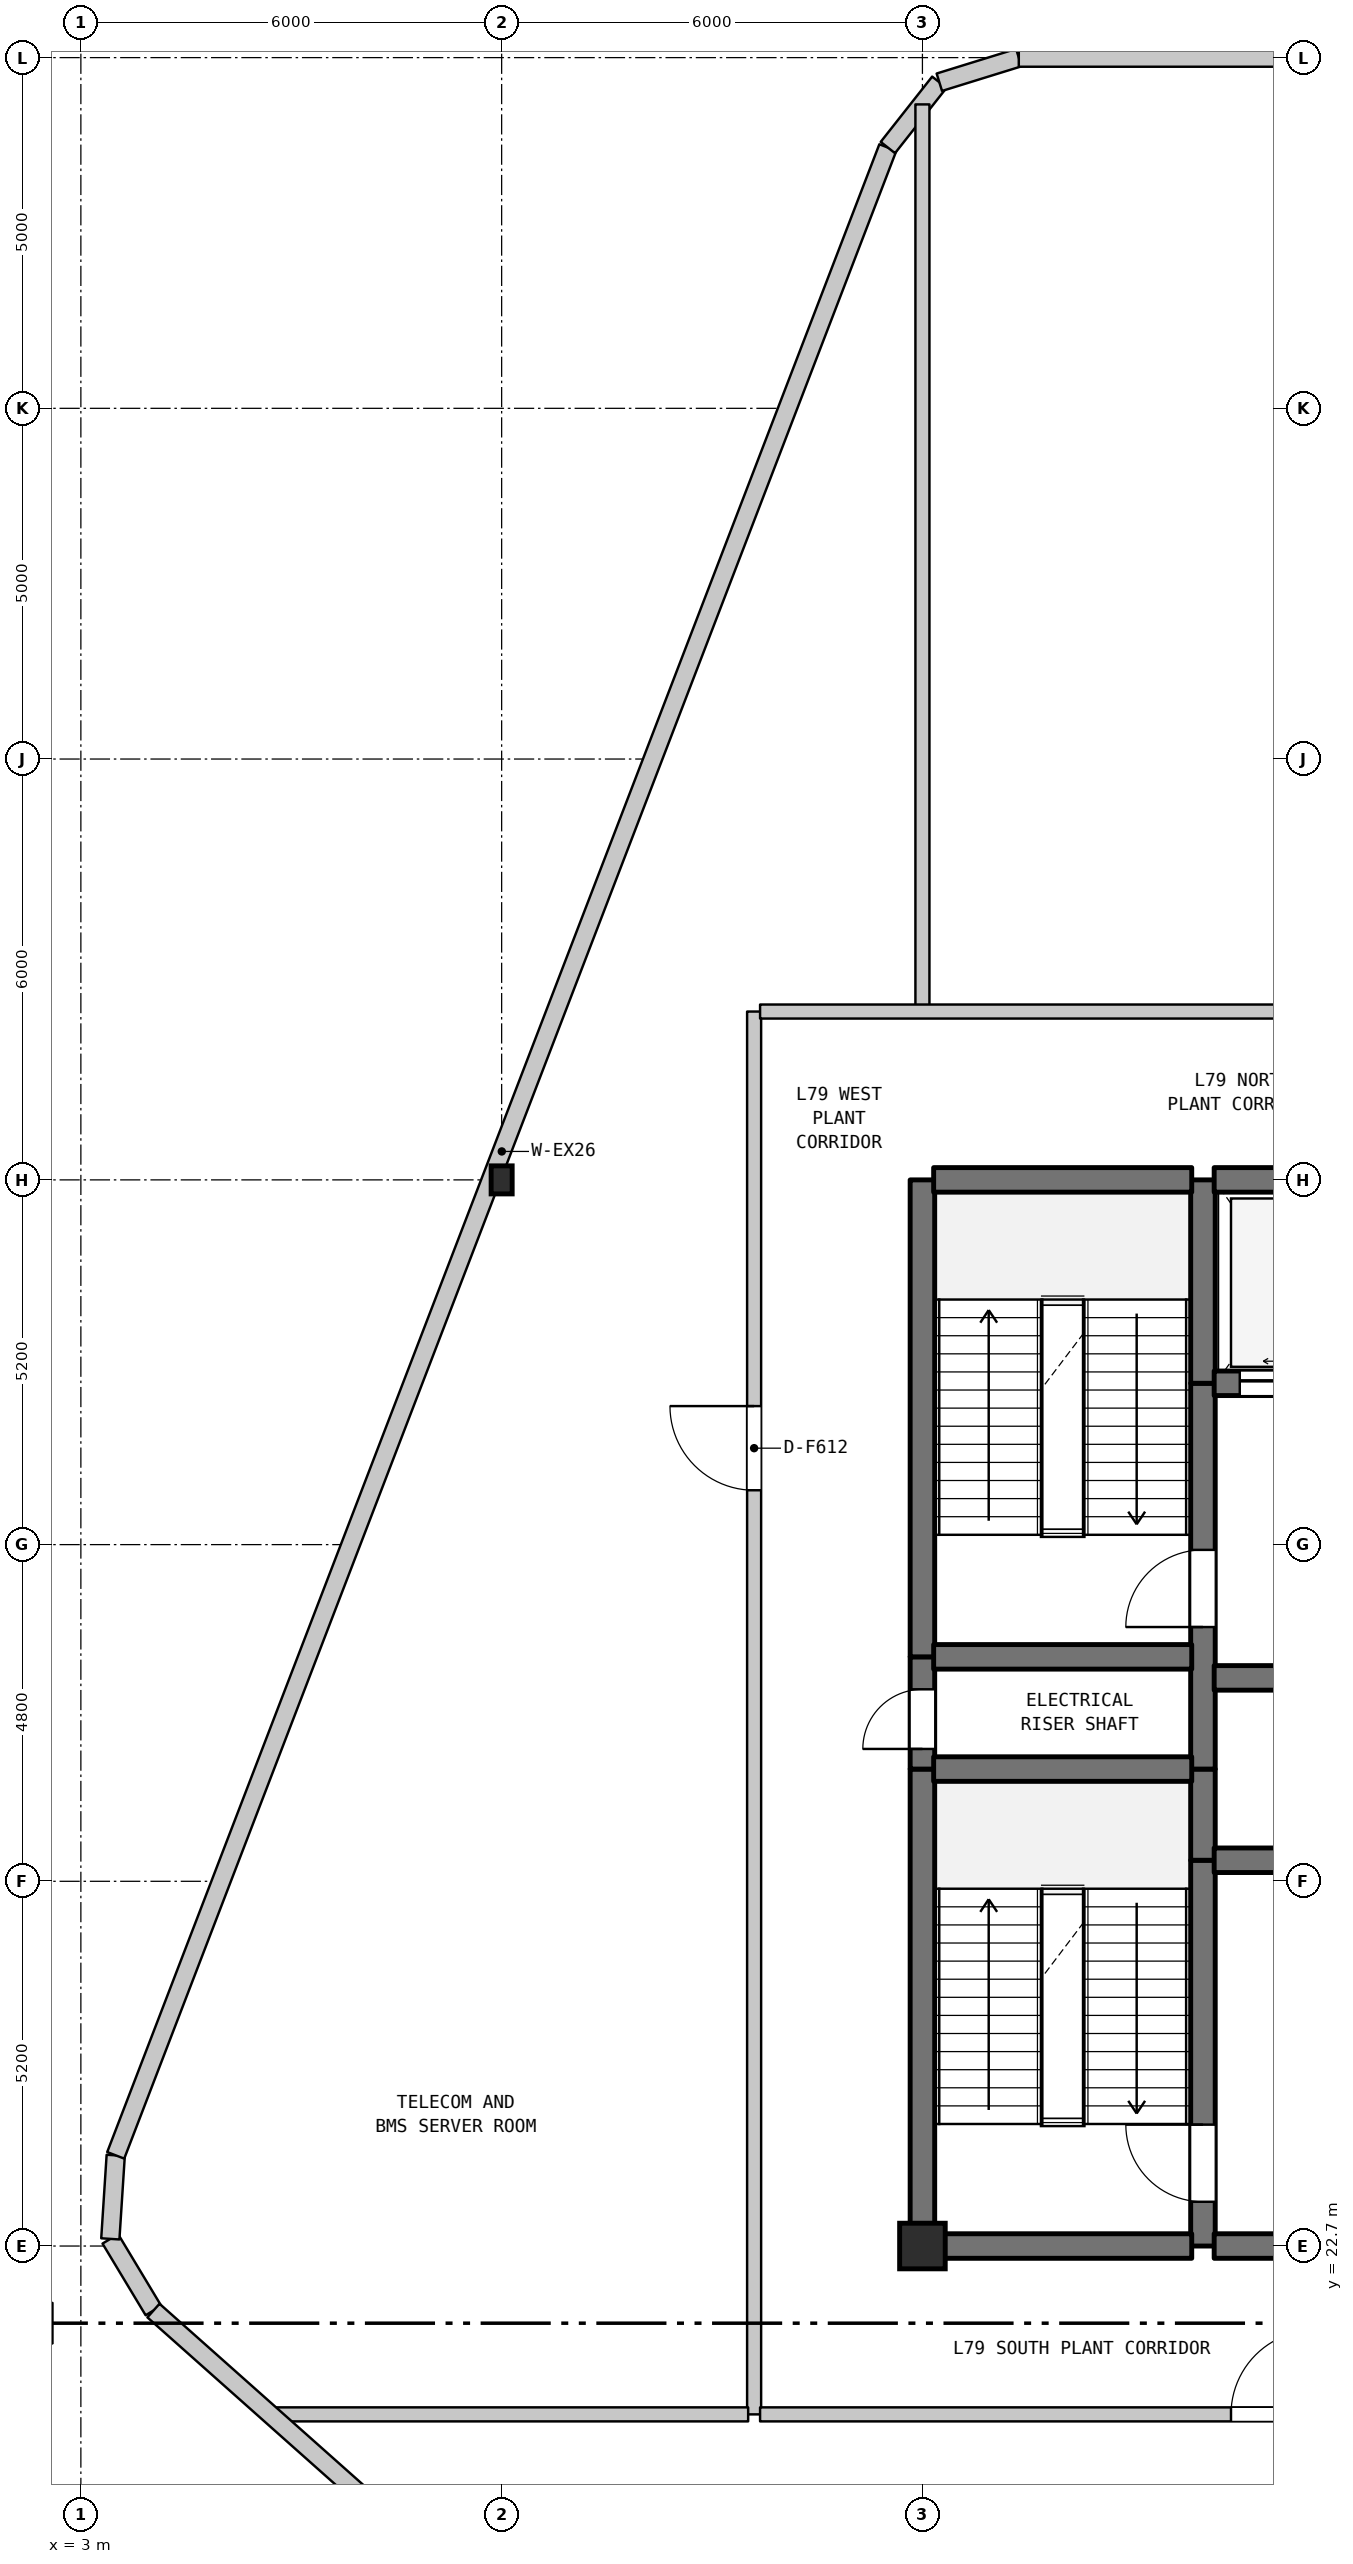
"""IFC4 building model, lengths in metres.
Left out: names, types, materials, properties, quantities, classifications, styles, units other than length and angle.
Written with IfcOpenShell. Run it as: python <this file> out.ifc"""

import sys

from ifc_helpers import new_model, si_unit, direction, frame, frame_2d, origin, origin_2d, place, context, subcontext, project, spatial, rectangle, i_section, extrude, element, fill, save


model = new_model("IFC4")
c1 = context("Model", 3, precision=1e-05, world=origin(), true_north=direction((0.0, 1.0)))
c2 = subcontext(c1, "Body", "Model", "MODEL_VIEW")
j1 = project(units=[si_unit("LENGTHUNIT", "METRE"), si_unit("PLANEANGLEUNIT", "RADIAN")], contexts=[c1])
p1 = place(None, origin())
s1 = spatial("IfcSite", under=j1, at=p1, CompositionType="ELEMENT")
p2 = place(p1, origin())
s2 = spatial("IfcBuilding", under=s1, at=p2, CompositionType="ELEMENT")
p3 = place(p2, frame((0.0, 0.0, 314.7)))
s3 = spatial("IfcBuildingStorey", under=s2, at=p3, CompositionType="ELEMENT", Elevation=314.7)
p4 = place(p3, frame((9.0, 37.9, 0.0), z_axis=(0.0, 0.0, 1.0), x_axis=(1.0, 0.0, 0.0)))
e1 = element("IfcColumn", 1, at=p4, inside=s3, PredefinedType="COLUMN", context=c2, shape_type="SweptSolid", body=[
    extrude(i_section(OverallWidth=0.3, OverallDepth=0.4, WebThickness=0.013, FlangeThickness=0.024, FilletRadius=0.027, at=origin_2d()), origin(), (0.0, 0.0, 1.0), 5.3),
])
p5 = place(p3, frame((15.0, 22.7, 0.0), z_axis=(0.0, 0.0, 1.0), x_axis=(1.0, 0.0, 0.0)))
e2 = element("IfcColumn", 2, at=p5, inside=s3, PredefinedType="COLUMN", context=c2, shape_type="SweptSolid", body=[
    extrude(rectangle(XDim=0.65, YDim=0.65, at=origin_2d()), origin(), (0.0, 0.0, 1.0), 5.3),
])
p6 = place(p3, frame((4.035, 21.78, 0.0), z_axis=(0.0, 0.0, 1.0), x_axis=(-0.51560906497, 0.856823956318, 0.0)))
e3 = element("IfcWall", 3, at=p6, inside=s3, PredefinedType="STANDARD", context=c2, shape_type="SweptSolid", body=[
    extrude(rectangle(XDim=1.193, YDim=0.26, at=frame_2d((0.596, 0.0))), origin(), (0.0, 0.0, 1.0), 4.99),
])
p7 = place(p3, frame((3.42, 22.802, 0.0), z_axis=(0.0, 0.0, 1.0), x_axis=(0.064645147091, 0.997908314906, 0.0)))
e4 = element("IfcWall", 4, at=p7, inside=s3, PredefinedType="STANDARD", context=c2, shape_type="SweptSolid", body=[
    extrude(rectangle(XDim=1.193, YDim=0.26, at=frame_2d((0.597, 0.0))), origin(), (0.0, 0.0, 1.0), 4.99),
])
p8 = place(p3, frame((3.497, 23.993, 0.0), z_axis=(0.0, 0.0, 1.0), x_axis=(0.358990281293, 0.93334129767, 0.0)))
e5 = element("IfcWall", 5, at=p8, inside=s3, PredefinedType="STANDARD", context=c2, shape_type="SweptSolid", body=[
    extrude(rectangle(XDim=30.669, YDim=0.26, at=frame_2d((15.335, 0.0))), origin(), (0.0, 0.0, 1.0), 4.99),
])
p9 = place(p3, frame((14.507, 52.618, 0.0), z_axis=(0.0, 0.0, 1.0), x_axis=(0.619003121736, 0.78538852505, 0.0)))
e6 = element("IfcWall", 6, at=p9, inside=s3, PredefinedType="STANDARD", context=c2, shape_type="SweptSolid", body=[
    extrude(rectangle(XDim=1.186, YDim=0.26, at=frame_2d((0.593, 0.0))), origin(), (0.0, 0.0, 1.0), 4.99),
])
p10 = place(p3, frame((15.241, 53.549, 0.0), z_axis=(0.0, 0.0, 1.0), x_axis=(0.955256816454, 0.295777643879, 0.0)))
e7 = element("IfcWall", 7, at=p10, inside=s3, PredefinedType="STANDARD", context=c2, shape_type="SweptSolid", body=[
    extrude(rectangle(XDim=1.186, YDim=0.26, at=frame_2d((0.593, 0.0))), origin(), (0.0, 0.0, 1.0), 4.99),
])
p11 = place(p3, frame((16.374, 53.9, 0.0), z_axis=(0.0, 0.0, 1.0), x_axis=(1.0, 0.0, 0.0)))
e8 = element("IfcWall", 8, at=p11, inside=s3, PredefinedType="STANDARD", context=c2, shape_type="SweptSolid", body=[
    extrude(rectangle(XDim=4.626, YDim=0.26, at=frame_2d((2.313, 0.0))), origin(), (0.0, 0.0, 1.0), 4.99),
])
p12 = place(p3, frame((12.6, 20.3, 0.0), z_axis=(0.0, 0.0, 1.0), x_axis=(0.0, 1.0, 0.0)))
e9 = element("IfcWall", 9, at=p12, inside=s3, PredefinedType="STANDARD", context=c2, shape_type="SweptSolid", body=[
    extrude(rectangle(XDim=20.0, YDim=0.2, at=frame_2d((10.0, 0.0))), origin(), (0.0, 0.0, 1.0), 4.99),
])
p13 = place(p12, frame((13.175, 0.0, 0.0)))
e10 = element("IfcOpeningElement", 10, at=p13, cuts=e9, PredefinedType="OPENING", context=c2, shape_type="SweptSolid", body=[
    extrude(rectangle(XDim=1.2, YDim=2.2, at=frame_2d((0.6, 1.1))), frame((0.0, 0.11, 0.0), z_axis=(0.0, -1.0, 0.0), x_axis=(1.0, 0.0, 0.0)), (0.0, 0.0, 1.0), 0.22),
])
p14 = place(p3, frame((15.0, 22.7, 0.0), z_axis=(0.0, 0.0, 1.0), x_axis=(0.0, 1.0, 0.0)))
e11 = element("IfcWall", 11, at=p14, inside=s3, PredefinedType="SHEAR", context=c2, shape_type="SweptSolid", body=[
    extrude(rectangle(XDim=6.8, YDim=0.35, at=frame_2d((3.4, 0.0))), origin(), (0.0, 0.0, 1.0), 4.99),
])
p15 = place(p3, frame((15.0, 29.5, 0.0), z_axis=(0.0, 0.0, 1.0), x_axis=(0.0, 1.0, 0.0)))
e12 = element("IfcWall", 12, at=p15, inside=s3, PredefinedType="SHEAR", context=c2, shape_type="SweptSolid", body=[
    extrude(rectangle(XDim=1.6, YDim=0.35, at=frame_2d((0.8, 0.0))), origin(), (0.0, 0.0, 1.0), 4.99),
])
p16 = place(p15, frame((0.287, 0.0, 0.0)))
e13 = element("IfcOpeningElement", 13, at=p16, cuts=e12, PredefinedType="OPENING", context=c2, shape_type="SweptSolid", body=[
    extrude(rectangle(XDim=0.85, YDim=2.1, at=frame_2d((0.425, 1.05))), frame((0.0, 0.185, 0.0), z_axis=(0.0, -1.0, 0.0), x_axis=(1.0, 0.0, 0.0)), (0.0, 0.0, 1.0), 0.37),
])
p17 = place(p3, frame((15.0, 31.1, 0.0), z_axis=(0.0, 0.0, 1.0), x_axis=(0.0, 1.0, 0.0)))
e14 = element("IfcWall", 14, at=p17, inside=s3, PredefinedType="SHEAR", context=c2, shape_type="SweptSolid", body=[
    extrude(rectangle(XDim=6.8, YDim=0.35, at=frame_2d((3.4, 0.0))), origin(), (0.0, 0.0, 1.0), 4.99),
])
p18 = place(p3, frame((15.0, 40.3, 0.0), z_axis=(0.0, 0.0, 1.0), x_axis=(0.0, 1.0, 0.0)))
e15 = element("IfcWall", 15, at=p18, inside=s3, PredefinedType="STANDARD", context=c2, shape_type="SweptSolid", body=[
    extrude(rectangle(XDim=12.933, YDim=0.2, at=frame_2d((6.466, 0.0))), origin(), (0.0, 0.0, 1.0), 4.99),
])
p19 = place(p3, frame((19.0, 22.7, 0.0), z_axis=(0.0, 0.0, 1.0), x_axis=(0.0, 1.0, 0.0)))
e16 = element("IfcWall", 16, at=p19, inside=s3, PredefinedType="SHEAR", context=c2, shape_type="SweptSolid", body=[
    extrude(rectangle(XDim=5.5, YDim=0.35, at=frame_2d((2.75, 0.0))), origin(), (0.0, 0.0, 1.0), 4.99),
])
p20 = place(p19, frame((0.631, 0.0, 0.0)))
e17 = element("IfcOpeningElement", 17, at=p20, cuts=e16, PredefinedType="OPENING", context=c2, shape_type="SweptSolid", body=[
    extrude(rectangle(XDim=1.1, YDim=2.15, at=frame_2d((0.55, 1.075))), frame((0.0, 0.185, 0.0), z_axis=(0.0, -1.0, 0.0), x_axis=(1.0, 0.0, 0.0)), (0.0, 0.0, 1.0), 0.37),
])
p21 = place(p3, frame((19.0, 28.2, 0.0), z_axis=(0.0, 0.0, 1.0), x_axis=(0.0, 1.0, 0.0)))
e18 = element("IfcWall", 18, at=p21, inside=s3, PredefinedType="SHEAR", context=c2, shape_type="SweptSolid", body=[
    extrude(rectangle(XDim=1.3, YDim=0.35, at=frame_2d((0.65, 0.0))), origin(), (0.0, 0.0, 1.0), 4.99),
])
p22 = place(p3, frame((19.0, 29.5, 0.0), z_axis=(0.0, 0.0, 1.0), x_axis=(0.0, 1.0, 0.0)))
e19 = element("IfcWall", 19, at=p22, inside=s3, PredefinedType="SHEAR", context=c2, shape_type="SweptSolid", body=[
    extrude(rectangle(XDim=5.5, YDim=0.35, at=frame_2d((2.75, 0.0))), origin(), (0.0, 0.0, 1.0), 4.99),
])
p23 = place(p22, frame((2.025, 0.0, 0.0)))
e20 = element("IfcOpeningElement", 20, at=p23, cuts=e19, PredefinedType="OPENING", context=c2, shape_type="SweptSolid", body=[
    extrude(rectangle(XDim=1.1, YDim=2.15, at=frame_2d((0.55, 1.075))), frame((0.0, 0.185, 0.0), z_axis=(0.0, -1.0, 0.0), x_axis=(1.0, 0.0, 0.0)), (0.0, 0.0, 1.0), 0.37),
])
p24 = place(p3, frame((19.0, 35.0, 0.0), z_axis=(0.0, 0.0, 1.0), x_axis=(0.0, 1.0, 0.0)))
e21 = element("IfcWall", 21, at=p24, inside=s3, PredefinedType="SHEAR", context=c2, shape_type="SweptSolid", body=[
    extrude(rectangle(XDim=2.9, YDim=0.35, at=frame_2d((1.45, 0.0))), origin(), (0.0, 0.0, 1.0), 4.99),
])
p25 = place(p3, frame((5.71, 20.3, 0.0), z_axis=(0.0, 0.0, 1.0), x_axis=(1.0, 0.0, 0.0)))
e22 = element("IfcWall", 22, at=p25, inside=s3, PredefinedType="STANDARD", context=c2, shape_type="SweptSolid", body=[
    extrude(rectangle(XDim=6.805, YDim=0.2, at=frame_2d((3.402, 0.0))), origin(), (0.0, 0.0, 1.0), 4.99),
])
p26 = place(p3, frame((12.685, 20.3, 0.0), z_axis=(0.0, 0.0, 1.0), x_axis=(1.0, 0.0, 0.0)))
e23 = element("IfcWall", 23, at=p26, inside=s3, PredefinedType="STANDARD", context=c2, shape_type="SweptSolid", body=[
    extrude(rectangle(XDim=20.23, YDim=0.2, at=frame_2d((10.115, 0.0))), origin(), (0.0, 0.0, 1.0), 4.99),
])
p27 = place(p26, frame((6.715, 0.0, 0.0)))
e24 = element("IfcOpeningElement", 24, at=p27, cuts=e23, PredefinedType="OPENING", context=c2, shape_type="SweptSolid", body=[
    extrude(rectangle(XDim=1.2, YDim=2.2, at=frame_2d((0.6, 1.1))), frame((0.0, 0.11, 0.0), z_axis=(0.0, -1.0, 0.0), x_axis=(1.0, 0.0, 0.0)), (0.0, 0.0, 1.0), 0.22),
])
p28 = place(p26, frame((16.14, 0.0, 0.0)))
e25 = element("IfcOpeningElement", 25, at=p28, cuts=e23, PredefinedType="OPENING", context=c2, shape_type="SweptSolid", body=[
    extrude(rectangle(XDim=1.2, YDim=2.2, at=frame_2d((0.6, 1.1))), frame((0.0, 0.11, 0.0), z_axis=(0.0, -1.0, 0.0), x_axis=(1.0, 0.0, 0.0)), (0.0, 0.0, 1.0), 0.22),
])
p29 = place(p3, frame((15.16, 22.7, 0.0), z_axis=(0.0, 0.0, 1.0), x_axis=(1.0, 0.0, 0.0)))
e26 = element("IfcWall", 26, at=p29, inside=s3, PredefinedType="SHEAR", context=c2, shape_type="SweptSolid", body=[
    extrude(rectangle(XDim=3.68, YDim=0.35, at=frame_2d((1.84, 0.0))), origin(), (0.0, 0.0, 1.0), 4.99),
])
p30 = place(p3, frame((19.16, 22.7, 0.0), z_axis=(0.0, 0.0, 1.0), x_axis=(1.0, 0.0, 0.0)))
e27 = element("IfcWall", 27, at=p30, inside=s3, PredefinedType="SHEAR", context=c2, shape_type="SweptSolid", body=[
    extrude(rectangle(XDim=4.48, YDim=0.35, at=frame_2d((2.24, 0.0))), origin(), (0.0, 0.0, 1.0), 4.99),
])
p31 = place(p30, frame((1.64, 0.0, 0.0)))
e28 = element("IfcOpeningElement", 28, at=p31, cuts=e27, PredefinedType="OPENING", context=c2, shape_type="SweptSolid", body=[
    extrude(rectangle(XDim=1.2, YDim=2.2, at=frame_2d((0.6, 1.1))), frame((0.0, 0.185, 0.0), z_axis=(0.0, -1.0, 0.0), x_axis=(1.0, 0.0, 0.0)), (0.0, 0.0, 1.0), 0.37),
])
p32 = place(p3, frame((19.16, 28.2, 0.0), z_axis=(0.0, 0.0, 1.0), x_axis=(1.0, 0.0, 0.0)))
e29 = element("IfcWall", 29, at=p32, inside=s3, PredefinedType="SHEAR", context=c2, shape_type="SweptSolid", body=[
    extrude(rectangle(XDim=4.48, YDim=0.35, at=frame_2d((2.24, 0.0))), origin(), (0.0, 0.0, 1.0), 4.99),
])
p33 = place(p32, frame((1.79, 0.0, 0.0)))
e30 = element("IfcOpeningElement", 30, at=p33, cuts=e29, PredefinedType="OPENING", context=c2, shape_type="SweptSolid", body=[
    extrude(rectangle(XDim=0.9, YDim=2.15, at=frame_2d((0.45, 1.075))), frame((0.0, 0.185, 0.0), z_axis=(0.0, -1.0, 0.0), x_axis=(1.0, 0.0, 0.0)), (0.0, 0.0, 1.0), 0.37),
])
p34 = place(p3, frame((15.16, 29.5, 0.0), z_axis=(0.0, 0.0, 1.0), x_axis=(1.0, 0.0, 0.0)))
e31 = element("IfcWall", 31, at=p34, inside=s3, PredefinedType="SHEAR", context=c2, shape_type="SweptSolid", body=[
    extrude(rectangle(XDim=3.68, YDim=0.35, at=frame_2d((1.84, 0.0))), origin(), (0.0, 0.0, 1.0), 4.99),
])
p35 = place(p3, frame((19.16, 30.8, 0.0), z_axis=(0.0, 0.0, 1.0), x_axis=(1.0, 0.0, 0.0)))
e32 = element("IfcWall", 32, at=p35, inside=s3, PredefinedType="SHEAR", context=c2, shape_type="SweptSolid", body=[
    extrude(rectangle(XDim=4.48, YDim=0.35, at=frame_2d((2.24, 0.0))), origin(), (0.0, 0.0, 1.0), 4.99),
])
p36 = place(p3, frame((15.16, 31.1, 0.0), z_axis=(0.0, 0.0, 1.0), x_axis=(1.0, 0.0, 0.0)))
e33 = element("IfcWall", 33, at=p36, inside=s3, PredefinedType="SHEAR", context=c2, shape_type="SweptSolid", body=[
    extrude(rectangle(XDim=3.68, YDim=0.35, at=frame_2d((1.84, 0.0))), origin(), (0.0, 0.0, 1.0), 4.99),
])
p37 = place(p3, frame((19.16, 35.0, 0.0), z_axis=(0.0, 0.0, 1.0), x_axis=(1.0, 0.0, 0.0)))
e34 = element("IfcWall", 34, at=p37, inside=s3, PredefinedType="SHEAR", context=c2, shape_type="SweptSolid", body=[
    extrude(rectangle(XDim=4.48, YDim=0.35, at=frame_2d((2.24, 0.0))), origin(), (0.0, 0.0, 1.0), 4.99),
])
p38 = place(p37, frame((0.365, 0.0, 0.0)))
e35 = element("IfcOpeningElement", 35, at=p38, cuts=e34, PredefinedType="OPENING", context=c2, shape_type="SweptSolid", body=[
    extrude(rectangle(XDim=1.35, YDim=2.2, at=frame_2d((0.675, 1.1))), frame((0.0, 0.185, 0.0), z_axis=(0.0, -1.0, 0.0), x_axis=(1.0, 0.0, 0.0)), (0.0, 0.0, 1.0), 0.37),
])
p39 = place(p37, frame((2.765, 0.0, 0.0)))
e36 = element("IfcOpeningElement", 36, at=p39, cuts=e34, PredefinedType="OPENING", context=c2, shape_type="SweptSolid", body=[
    extrude(rectangle(XDim=1.35, YDim=2.2, at=frame_2d((0.675, 1.1))), frame((0.0, 0.185, 0.0), z_axis=(0.0, -1.0, 0.0), x_axis=(1.0, 0.0, 0.0)), (0.0, 0.0, 1.0), 0.37),
])
p40 = place(p3, frame((15.16, 37.9, 0.0), z_axis=(0.0, 0.0, 1.0), x_axis=(1.0, 0.0, 0.0)))
e37 = element("IfcWall", 37, at=p40, inside=s3, PredefinedType="SHEAR", context=c2, shape_type="SweptSolid", body=[
    extrude(rectangle(XDim=3.68, YDim=0.35, at=frame_2d((1.84, 0.0))), origin(), (0.0, 0.0, 1.0), 4.99),
])
p41 = place(p3, frame((19.16, 37.9, 0.0), z_axis=(0.0, 0.0, 1.0), x_axis=(1.0, 0.0, 0.0)))
e38 = element("IfcWall", 38, at=p41, inside=s3, PredefinedType="SHEAR", context=c2, shape_type="SweptSolid", body=[
    extrude(rectangle(XDim=4.48, YDim=0.35, at=frame_2d((2.24, 0.0))), origin(), (0.0, 0.0, 1.0), 4.99),
])
p42 = place(p3, frame((12.685, 40.3, 0.0), z_axis=(0.0, 0.0, 1.0), x_axis=(1.0, 0.0, 0.0)))
e39 = element("IfcWall", 39, at=p42, inside=s3, PredefinedType="STANDARD", context=c2, shape_type="SweptSolid", body=[
    extrude(rectangle(XDim=20.23, YDim=0.2, at=frame_2d((10.115, 0.0))), origin(), (0.0, 0.0, 1.0), 4.99),
])
p43 = place(p42, frame((12.14, 0.0, 0.0)))
e40 = element("IfcOpeningElement", 40, at=p43, cuts=e39, PredefinedType="OPENING", context=c2, shape_type="SweptSolid", body=[
    extrude(rectangle(XDim=1.2, YDim=2.2, at=frame_2d((0.6, 1.1))), frame((0.0, 0.11, 0.0), z_axis=(0.0, -1.0, 0.0), x_axis=(1.0, 0.0, 0.0)), (0.0, 0.0, 1.0), 0.22),
])
p44 = place(p3, frame((17.438, 9.866, 0.0), z_axis=(0.0, 0.0, 1.0), x_axis=(-0.747416078768, 0.664356233657, 0.0)))
e41 = element("IfcWall", 41, at=p44, inside=s3, PredefinedType="STANDARD", context=c2, shape_type="SweptSolid", body=[
    extrude(rectangle(XDim=17.933, YDim=0.26, at=frame_2d((8.966, 0.0))), origin(), (0.0, 0.0, 1.0), 4.99),
])
p45 = place(p13, origin())
e42 = element("IfcDoor", 42, at=p45, inside=s3, OperationType="SINGLE_SWING_RIGHT", PredefinedType="DOOR", context=c2, shape_type="SweptSolid", body=[
    extrude(rectangle(XDim=1.2, YDim=2.2, at=frame_2d((0.6, 1.1))), frame((0.0, 0.025, 0.0), z_axis=(0.0, -1.0, 0.0), x_axis=(1.0, 0.0, 0.0)), (0.0, 0.0, 1.0), 0.05),
])
fill(e10, e42)
p46 = place(p16, origin())
e43 = element("IfcDoor", 43, at=p46, inside=s3, OperationType="SINGLE_SWING_LEFT", PredefinedType="DOOR", context=c2, shape_type="SweptSolid", body=[
    extrude(rectangle(XDim=0.85, YDim=2.1, at=frame_2d((0.425, 1.05))), frame((0.0, 0.025, 0.0), z_axis=(0.0, -1.0, 0.0), x_axis=(1.0, 0.0, 0.0)), (0.0, 0.0, 1.0), 0.05),
])
fill(e13, e43)
p47 = place(p20, origin())
e44 = element("IfcDoor", 44, at=p47, inside=s3, OperationType="SINGLE_SWING_RIGHT", PredefinedType="DOOR", context=c2, shape_type="SweptSolid", body=[
    extrude(rectangle(XDim=1.1, YDim=2.15, at=frame_2d((0.55, 1.075))), frame((0.0, 0.025, 0.0), z_axis=(0.0, -1.0, 0.0), x_axis=(1.0, 0.0, 0.0)), (0.0, 0.0, 1.0), 0.05),
])
fill(e17, e44)
p48 = place(p23, origin())
e45 = element("IfcDoor", 45, at=p48, inside=s3, OperationType="SINGLE_SWING_LEFT", PredefinedType="DOOR", context=c2, shape_type="SweptSolid", body=[
    extrude(rectangle(XDim=1.1, YDim=2.15, at=frame_2d((0.55, 1.075))), frame((0.0, 0.025, 0.0), z_axis=(0.0, -1.0, 0.0), x_axis=(1.0, 0.0, 0.0)), (0.0, 0.0, 1.0), 0.05),
])
fill(e20, e45)
p49 = place(p27, origin())
e46 = element("IfcDoor", 46, at=p49, inside=s3, OperationType="SINGLE_SWING_RIGHT", PredefinedType="DOOR", context=c2, shape_type="SweptSolid", body=[
    extrude(rectangle(XDim=1.2, YDim=2.2, at=frame_2d((0.6, 1.1))), frame((0.0, 0.025, 0.0), z_axis=(0.0, -1.0, 0.0), x_axis=(1.0, 0.0, 0.0)), (0.0, 0.0, 1.0), 0.05),
])
fill(e24, e46)
p50 = place(p38, origin())
e47 = element("IfcDoor", 47, at=p50, inside=s3, OperationType="DOUBLE_DOOR_SLIDING", PredefinedType="DOOR", context=c2, shape_type="SweptSolid", body=[
    extrude(rectangle(XDim=1.35, YDim=2.2, at=frame_2d((0.675, 1.1))), frame((0.0, 0.025, 0.0), z_axis=(0.0, -1.0, 0.0), x_axis=(1.0, 0.0, 0.0)), (0.0, 0.0, 1.0), 0.05),
])
fill(e35, e47)
save(model, sys.argv[1])
